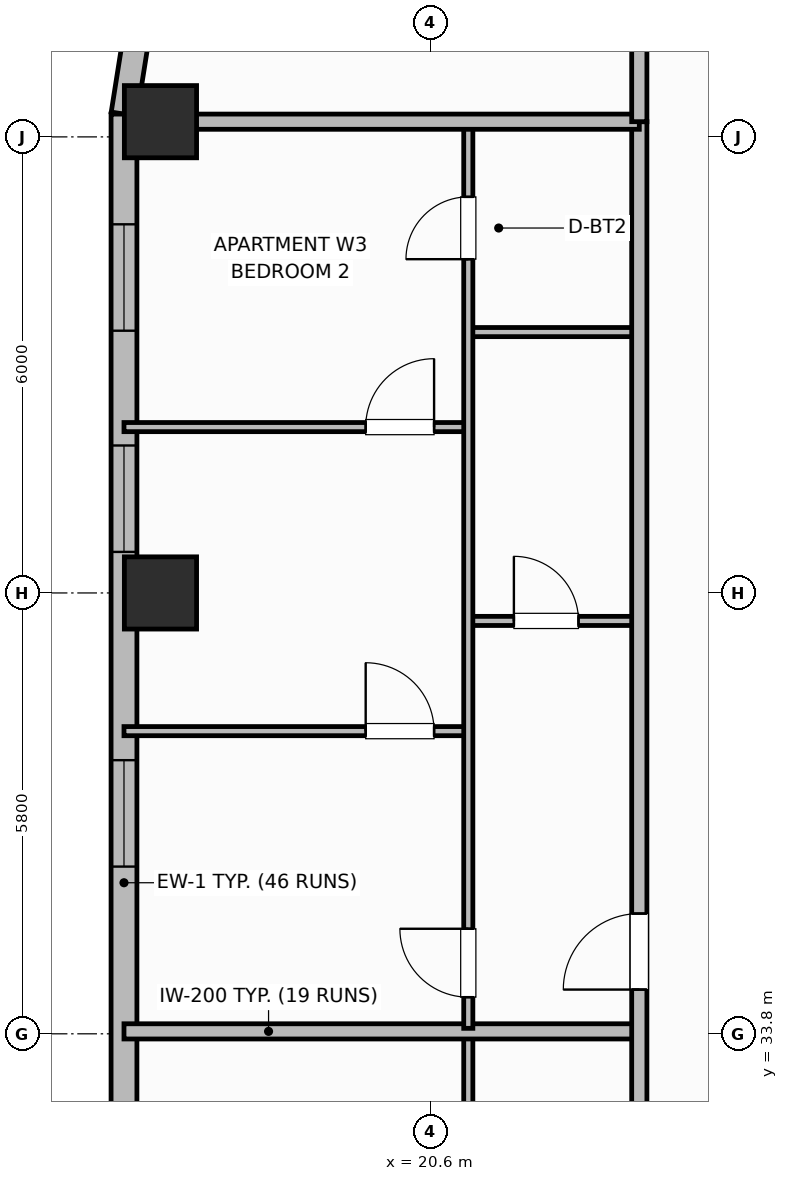
"""IFC4 building model, lengths in metres.
Left out: names, types, materials, properties, quantities, classifications, styles, units other than length and angle.
Written with IfcOpenShell. Run it as: python <this file> out.ifc"""

import sys

from ifc_helpers import new_model, si_unit, direction, frame, frame_2d, origin, origin_2d, place, context, subcontext, project, spatial, rectangle, extrude, element, fill, save


model = new_model("IFC4")
c1 = context("Model", 3, precision=1e-05, world=origin(), true_north=direction((0.0, 1.0)))
c2 = subcontext(c1, "Body", "Model", "MODEL_VIEW")
j1 = project(units=[si_unit("LENGTHUNIT", "METRE"), si_unit("PLANEANGLEUNIT", "RADIAN")], contexts=[c1])
p1 = place(None, origin())
s1 = spatial("IfcSite", under=j1, at=p1, CompositionType="ELEMENT")
p2 = place(p1, origin())
s2 = spatial("IfcBuilding", under=s1, at=p2, CompositionType="ELEMENT")
p3 = place(p2, frame((0.0, 0.0, 155.2)))
s3 = spatial("IfcBuildingStorey", under=s2, at=p3, CompositionType="ELEMENT", Elevation=155.2)
for number, where, z_axis, x_axis in (
    (1, (17.05, 39.6, 0.0), (0.0, 0.0, 1.0), (1.0, 0.0, 0.0)),
    (2, (17.05, 45.8, 0.0), (0.0, 0.0, 1.0), (1.0, 0.0, 0.0)),
):
    element("IfcColumn", number, at=place(p3, frame(where, z_axis=z_axis, x_axis=x_axis)), inside=s3, PredefinedType="COLUMN", context=c2, shape_type="SweptSolid", body=[
        extrude(rectangle(XDim=0.95, YDim=0.95, at=origin_2d()), origin(), (0.0, 0.0, 1.0), 3.7),
    ])
p4 = place(p3, frame((16.748, 47.022, 0.0), z_axis=(0.0, 0.0, 1.0), x_axis=(-0.156481329164, -0.987680916907, 0.0)))
e3 = element("IfcWall", 3, at=p4, inside=s3, PredefinedType="SOLIDWALL", context=c2, shape_type="SweptSolid", body=[
    extrude(rectangle(XDim=1.136, YDim=0.34, at=frame_2d((0.568, 0.0))), origin(), (0.0, 0.0, 1.0), 2.72),
])
p5 = place(p3, frame((16.57, 45.9, 0.0), z_axis=(0.0, 0.0, 1.0), x_axis=(0.0, -1.0, 0.0)))
e4 = element("IfcWall", 4, at=p5, inside=s3, PredefinedType="SOLIDWALL", context=c2, shape_type="SweptSolid", body=[
    extrude(rectangle(XDim=13.3, YDim=0.34, at=frame_2d((6.65, 0.0))), origin(), (0.0, 0.0, 1.0), 2.72),
])
p6 = place(p5, frame((1.45, 0.0, 0.75)))
e5 = element("IfcOpeningElement", 5, at=p6, cuts=e4, PredefinedType="OPENING", context=c2, shape_type="SweptSolid", body=[
    extrude(rectangle(XDim=1.4, YDim=1.85, at=frame_2d((0.7, 0.925))), frame((0.0, 0.18, 0.0), z_axis=(0.0, -1.0, 0.0), x_axis=(1.0, 0.0, 0.0)), (0.0, 0.0, 1.0), 0.36),
])
p7 = place(p5, frame((4.36, 0.0, 0.71)))
e6 = element("IfcOpeningElement", 6, at=p7, cuts=e4, PredefinedType="OPENING", context=c2, shape_type="SweptSolid", body=[
    extrude(rectangle(XDim=1.4, YDim=1.85, at=frame_2d((0.7, 0.925))), frame((0.0, 0.18, 0.0), z_axis=(0.0, -1.0, 0.0), x_axis=(1.0, 0.0, 0.0)), (0.0, 0.0, 1.0), 0.36),
])
p8 = place(p5, frame((8.5, 0.0, 0.75)))
e7 = element("IfcOpeningElement", 7, at=p8, cuts=e4, PredefinedType="OPENING", context=c2, shape_type="SweptSolid", body=[
    extrude(rectangle(XDim=1.4, YDim=1.85, at=frame_2d((0.7, 0.925))), frame((0.0, 0.18, 0.0), z_axis=(0.0, -1.0, 0.0), x_axis=(1.0, 0.0, 0.0)), (0.0, 0.0, 1.0), 0.36),
])
p9 = place(p3, frame((21.1, 22.74, 0.0), z_axis=(0.0, 0.0, 1.0), x_axis=(0.0, 1.0, 0.0)))
e8 = element("IfcWall", 8, at=p9, inside=s3, PredefinedType="PARTITIONING", context=c2, shape_type="SweptSolid", body=[
    extrude(rectangle(XDim=11.052, YDim=0.12, at=frame_2d((5.526, 0.0))), origin(), (0.0, 0.0, 1.0), 2.55),
])
p10 = place(p9, frame((0.41, 0.0, 0.0)))
e9 = element("IfcOpeningElement", 9, at=p10, cuts=e8, PredefinedType="OPENING", context=c2, shape_type="SweptSolid", body=[
    extrude(rectangle(XDim=0.9, YDim=2.1, at=frame_2d((0.45, 1.05))), frame((0.0, 0.07, 0.0), z_axis=(0.0, -1.0, 0.0), x_axis=(1.0, 0.0, 0.0)), (0.0, 0.0, 1.0), 0.14),
])
p11 = place(p3, frame((16.57, 33.832, 0.0), z_axis=(0.0, 0.0, 1.0), x_axis=(1.0, 0.0, 0.0)))
e10 = element("IfcWall", 10, at=p11, inside=s3, PredefinedType="PARTITIONING", context=c2, shape_type="SweptSolid", body=[
    extrude(rectangle(XDim=6.78, YDim=0.2, at=frame_2d((3.39, 0.0))), origin(), (0.0, 0.0, 1.0), 2.55),
])
p12 = place(p3, frame((21.1, 39.232, 0.0), z_axis=(0.0, 0.0, 1.0), x_axis=(1.0, 0.0, 0.0)))
e11 = element("IfcWall", 11, at=p12, inside=s3, PredefinedType="PARTITIONING", context=c2, shape_type="SweptSolid", body=[
    extrude(rectangle(XDim=2.25, YDim=0.12, at=frame_2d((1.125, 0.0))), origin(), (0.0, 0.0, 1.0), 2.55),
])
p13 = place(p12, frame((0.6, 0.0, 0.0)))
e12 = element("IfcOpeningElement", 12, at=p13, cuts=e11, PredefinedType="OPENING", context=c2, shape_type="SweptSolid", body=[
    extrude(rectangle(XDim=0.85, YDim=2.1, at=frame_2d((0.425, 1.05))), frame((0.0, 0.07, 0.0), z_axis=(0.0, -1.0, 0.0), x_axis=(1.0, 0.0, 0.0)), (0.0, 0.0, 1.0), 0.14),
])
p14 = place(p3, frame((21.1, 43.032, 0.0), z_axis=(0.0, 0.0, 1.0), x_axis=(1.0, 0.0, 0.0)))
e13 = element("IfcWall", 13, at=p14, inside=s3, PredefinedType="PARTITIONING", context=c2, shape_type="SweptSolid", body=[
    extrude(rectangle(XDim=2.25, YDim=0.12, at=frame_2d((1.125, 0.0))), origin(), (0.0, 0.0, 1.0), 2.55),
])
p15 = place(p3, frame((16.57, 37.782, 0.0), z_axis=(0.0, 0.0, 1.0), x_axis=(1.0, 0.0, 0.0)))
e14 = element("IfcWall", 14, at=p15, inside=s3, PredefinedType="PARTITIONING", context=c2, shape_type="SweptSolid", body=[
    extrude(rectangle(XDim=4.53, YDim=0.12, at=frame_2d((2.265, 0.0))), origin(), (0.0, 0.0, 1.0), 2.55),
])
p16 = place(p15, frame((3.18, 0.0, 0.0)))
e15 = element("IfcOpeningElement", 15, at=p16, cuts=e14, PredefinedType="OPENING", context=c2, shape_type="SweptSolid", body=[
    extrude(rectangle(XDim=0.9, YDim=2.1, at=frame_2d((0.45, 1.05))), frame((0.0, 0.07, 0.0), z_axis=(0.0, -1.0, 0.0), x_axis=(1.0, 0.0, 0.0)), (0.0, 0.0, 1.0), 0.14),
])
p17 = place(p3, frame((16.57, 41.782, 0.0), z_axis=(0.0, 0.0, 1.0), x_axis=(1.0, 0.0, 0.0)))
e16 = element("IfcWall", 16, at=p17, inside=s3, PredefinedType="PARTITIONING", context=c2, shape_type="SweptSolid", body=[
    extrude(rectangle(XDim=4.53, YDim=0.12, at=frame_2d((2.265, 0.0))), origin(), (0.0, 0.0, 1.0), 2.55),
])
p18 = place(p17, frame((3.18, 0.0, 0.0)))
e17 = element("IfcOpeningElement", 17, at=p18, cuts=e16, PredefinedType="OPENING", context=c2, shape_type="SweptSolid", body=[
    extrude(rectangle(XDim=0.9, YDim=2.1, at=frame_2d((0.45, 1.05))), frame((0.0, 0.07, 0.0), z_axis=(0.0, -1.0, 0.0), x_axis=(1.0, 0.0, 0.0)), (0.0, 0.0, 1.0), 0.14),
])
p19 = place(p3, frame((21.1, 33.872, 0.0), z_axis=(0.0, 0.0, 1.0), x_axis=(0.0, 1.0, 0.0)))
e18 = element("IfcWall", 18, at=p19, inside=s3, PredefinedType="PARTITIONING", context=c2, shape_type="SweptSolid", body=[
    extrude(rectangle(XDim=11.888, YDim=0.12, at=frame_2d((5.944, 0.0))), origin(), (0.0, 0.0, 1.0), 2.55),
])
p20 = place(p19, frame((0.41, 0.0, 0.0)))
e19 = element("IfcOpeningElement", 19, at=p20, cuts=e18, PredefinedType="OPENING", context=c2, shape_type="SweptSolid", body=[
    extrude(rectangle(XDim=0.9, YDim=2.1, at=frame_2d((0.45, 1.05))), frame((0.0, 0.07, 0.0), z_axis=(0.0, -1.0, 0.0), x_axis=(1.0, 0.0, 0.0)), (0.0, 0.0, 1.0), 0.14),
])
p21 = place(p19, frame((10.119, 0.0, 0.0)))
e20 = element("IfcOpeningElement", 20, at=p21, cuts=e18, PredefinedType="OPENING", context=c2, shape_type="SweptSolid", body=[
    extrude(rectangle(XDim=0.82, YDim=2.08, at=frame_2d((0.41, 1.04))), frame((0.0, 0.07, 0.0), z_axis=(0.0, -1.0, 0.0), x_axis=(1.0, 0.0, 0.0)), (0.0, 0.0, 1.0), 0.14),
])
p22 = place(p3, frame((23.35, 10.6, 0.0), z_axis=(0.0, 0.0, 1.0), x_axis=(0.0, 1.0, 0.0)))
e21 = element("IfcWall", 21, at=p22, inside=s3, PredefinedType="PARTITIONING", context=c2, shape_type="SweptSolid", body=[
    extrude(rectangle(XDim=35.2, YDim=0.2, at=frame_2d((17.6, 0.0))), origin(), (0.0, 0.0, 1.0), 2.55),
])
p23 = place(p22, frame((2.65, 0.0, 0.0)))
e22 = element("IfcOpeningElement", 22, at=p23, cuts=e21, PredefinedType="OPENING", context=c2, shape_type="SweptSolid", body=[
    extrude(rectangle(XDim=1.0, YDim=2.15, at=frame_2d((0.5, 1.075))), frame((0.0, 0.11, 0.0), z_axis=(0.0, -1.0, 0.0), x_axis=(1.0, 0.0, 0.0)), (0.0, 0.0, 1.0), 0.22),
])
p24 = place(p22, frame((12.65, 0.0, 0.0)))
e23 = element("IfcOpeningElement", 23, at=p24, cuts=e21, PredefinedType="OPENING", context=c2, shape_type="SweptSolid", body=[
    extrude(rectangle(XDim=1.0, YDim=2.15, at=frame_2d((0.5, 1.075))), frame((0.0, 0.11, 0.0), z_axis=(0.0, -1.0, 0.0), x_axis=(1.0, 0.0, 0.0)), (0.0, 0.0, 1.0), 0.22),
])
p25 = place(p22, frame((23.782, 0.0, 0.0)))
e24 = element("IfcOpeningElement", 24, at=p25, cuts=e21, PredefinedType="OPENING", context=c2, shape_type="SweptSolid", body=[
    extrude(rectangle(XDim=1.0, YDim=2.15, at=frame_2d((0.5, 1.075))), frame((0.0, 0.11, 0.0), z_axis=(0.0, -1.0, 0.0), x_axis=(1.0, 0.0, 0.0)), (0.0, 0.0, 1.0), 0.22),
])
p26 = place(p3, frame((16.99, 45.8, 0.0), z_axis=(0.0, 0.0, 1.0), x_axis=(1.0, 0.0, 0.0)))
e25 = element("IfcWall", 25, at=p26, inside=s3, PredefinedType="PARTITIONING", context=c2, shape_type="SweptSolid", body=[
    extrude(rectangle(XDim=6.36, YDim=0.2, at=frame_2d((3.18, 0.0))), origin(), (0.0, 0.0, 1.0), 2.55),
])
p27 = place(p3, frame((23.35, 45.8, 0.0), z_axis=(0.0, 0.0, 1.0), x_axis=(0.0, 1.0, 0.0)))
e26 = element("IfcWall", 26, at=p27, inside=s3, PredefinedType="PARTITIONING", context=c2, shape_type="SweptSolid", body=[
    extrude(rectangle(XDim=3.73, YDim=0.2, at=frame_2d((1.865, 0.0))), origin(), (0.0, 0.0, 1.0), 2.55),
])
p28 = place(p6, origin())
e27 = element("IfcWindow", 27, at=p28, inside=s3, PartitioningType="SINGLE_PANEL", PredefinedType="WINDOW", context=c2, shape_type="SweptSolid", body=[
    extrude(rectangle(XDim=1.4, YDim=1.85, at=frame_2d((0.7, 0.925))), frame((0.0, 0.03, 0.0), z_axis=(0.0, -1.0, 0.0), x_axis=(1.0, 0.0, 0.0)), (0.0, 0.0, 1.0), 0.06),
])
fill(e5, e27)
p29 = place(p7, origin())
e28 = element("IfcWindow", 28, at=p29, inside=s3, PartitioningType="SINGLE_PANEL", PredefinedType="WINDOW", context=c2, shape_type="SweptSolid", body=[
    extrude(rectangle(XDim=1.4, YDim=1.85, at=frame_2d((0.7, 0.925))), frame((0.0, 0.03, 0.0), z_axis=(0.0, -1.0, 0.0), x_axis=(1.0, 0.0, 0.0)), (0.0, 0.0, 1.0), 0.06),
])
fill(e6, e28)
p30 = place(p8, origin())
e29 = element("IfcWindow", 29, at=p30, inside=s3, PartitioningType="SINGLE_PANEL", PredefinedType="WINDOW", context=c2, shape_type="SweptSolid", body=[
    extrude(rectangle(XDim=1.4, YDim=1.85, at=frame_2d((0.7, 0.925))), frame((0.0, 0.03, 0.0), z_axis=(0.0, -1.0, 0.0), x_axis=(1.0, 0.0, 0.0)), (0.0, 0.0, 1.0), 0.06),
])
fill(e7, e29)
p31 = place(p13, origin())
e30 = element("IfcDoor", 30, at=p31, inside=s3, OperationType="SINGLE_SWING_LEFT", PredefinedType="DOOR", context=c2, shape_type="SweptSolid", body=[
    extrude(rectangle(XDim=0.85, YDim=2.1, at=frame_2d((0.425, 1.05))), frame((0.0, 0.025, 0.0), z_axis=(0.0, -1.0, 0.0), x_axis=(1.0, 0.0, 0.0)), (0.0, 0.0, 1.0), 0.05),
])
fill(e12, e30)
p32 = place(p16, origin())
e31 = element("IfcDoor", 31, at=p32, inside=s3, OperationType="SINGLE_SWING_LEFT", PredefinedType="DOOR", context=c2, shape_type="SweptSolid", body=[
    extrude(rectangle(XDim=0.9, YDim=2.1, at=frame_2d((0.45, 1.05))), frame((0.0, 0.025, 0.0), z_axis=(0.0, -1.0, 0.0), x_axis=(1.0, 0.0, 0.0)), (0.0, 0.0, 1.0), 0.05),
])
fill(e15, e31)
p33 = place(p18, origin())
e32 = element("IfcDoor", 32, at=p33, inside=s3, OperationType="SINGLE_SWING_RIGHT", PredefinedType="DOOR", context=c2, shape_type="SweptSolid", body=[
    extrude(rectangle(XDim=0.9, YDim=2.1, at=frame_2d((0.45, 1.05))), frame((0.0, 0.025, 0.0), z_axis=(0.0, -1.0, 0.0), x_axis=(1.0, 0.0, 0.0)), (0.0, 0.0, 1.0), 0.05),
])
fill(e17, e32)
p34 = place(p20, origin())
e33 = element("IfcDoor", 33, at=p34, inside=s3, OperationType="SINGLE_SWING_RIGHT", PredefinedType="DOOR", context=c2, shape_type="SweptSolid", body=[
    extrude(rectangle(XDim=0.9, YDim=2.1, at=frame_2d((0.45, 1.05))), frame((0.0, 0.025, 0.0), z_axis=(0.0, -1.0, 0.0), x_axis=(1.0, 0.0, 0.0)), (0.0, 0.0, 1.0), 0.05),
])
fill(e19, e33)
p35 = place(p21, origin())
e34 = element("IfcDoor", 34, at=p35, inside=s3, OperationType="SINGLE_SWING_LEFT", PredefinedType="DOOR", context=c2, shape_type="SweptSolid", body=[
    extrude(rectangle(XDim=0.82, YDim=2.08, at=frame_2d((0.41, 1.04))), frame((0.0, 0.025, 0.0), z_axis=(0.0, -1.0, 0.0), x_axis=(1.0, 0.0, 0.0)), (0.0, 0.0, 1.0), 0.05),
])
fill(e20, e34)
p36 = place(p25, origin())
e35 = element("IfcDoor", 35, at=p36, inside=s3, OperationType="SINGLE_SWING_LEFT", PredefinedType="DOOR", context=c2, shape_type="SweptSolid", body=[
    extrude(rectangle(XDim=1.0, YDim=2.15, at=frame_2d((0.5, 1.075))), frame((0.0, 0.025, 0.0), z_axis=(0.0, -1.0, 0.0), x_axis=(1.0, 0.0, 0.0)), (0.0, 0.0, 1.0), 0.05),
])
fill(e24, e35)
save(model, sys.argv[1])
